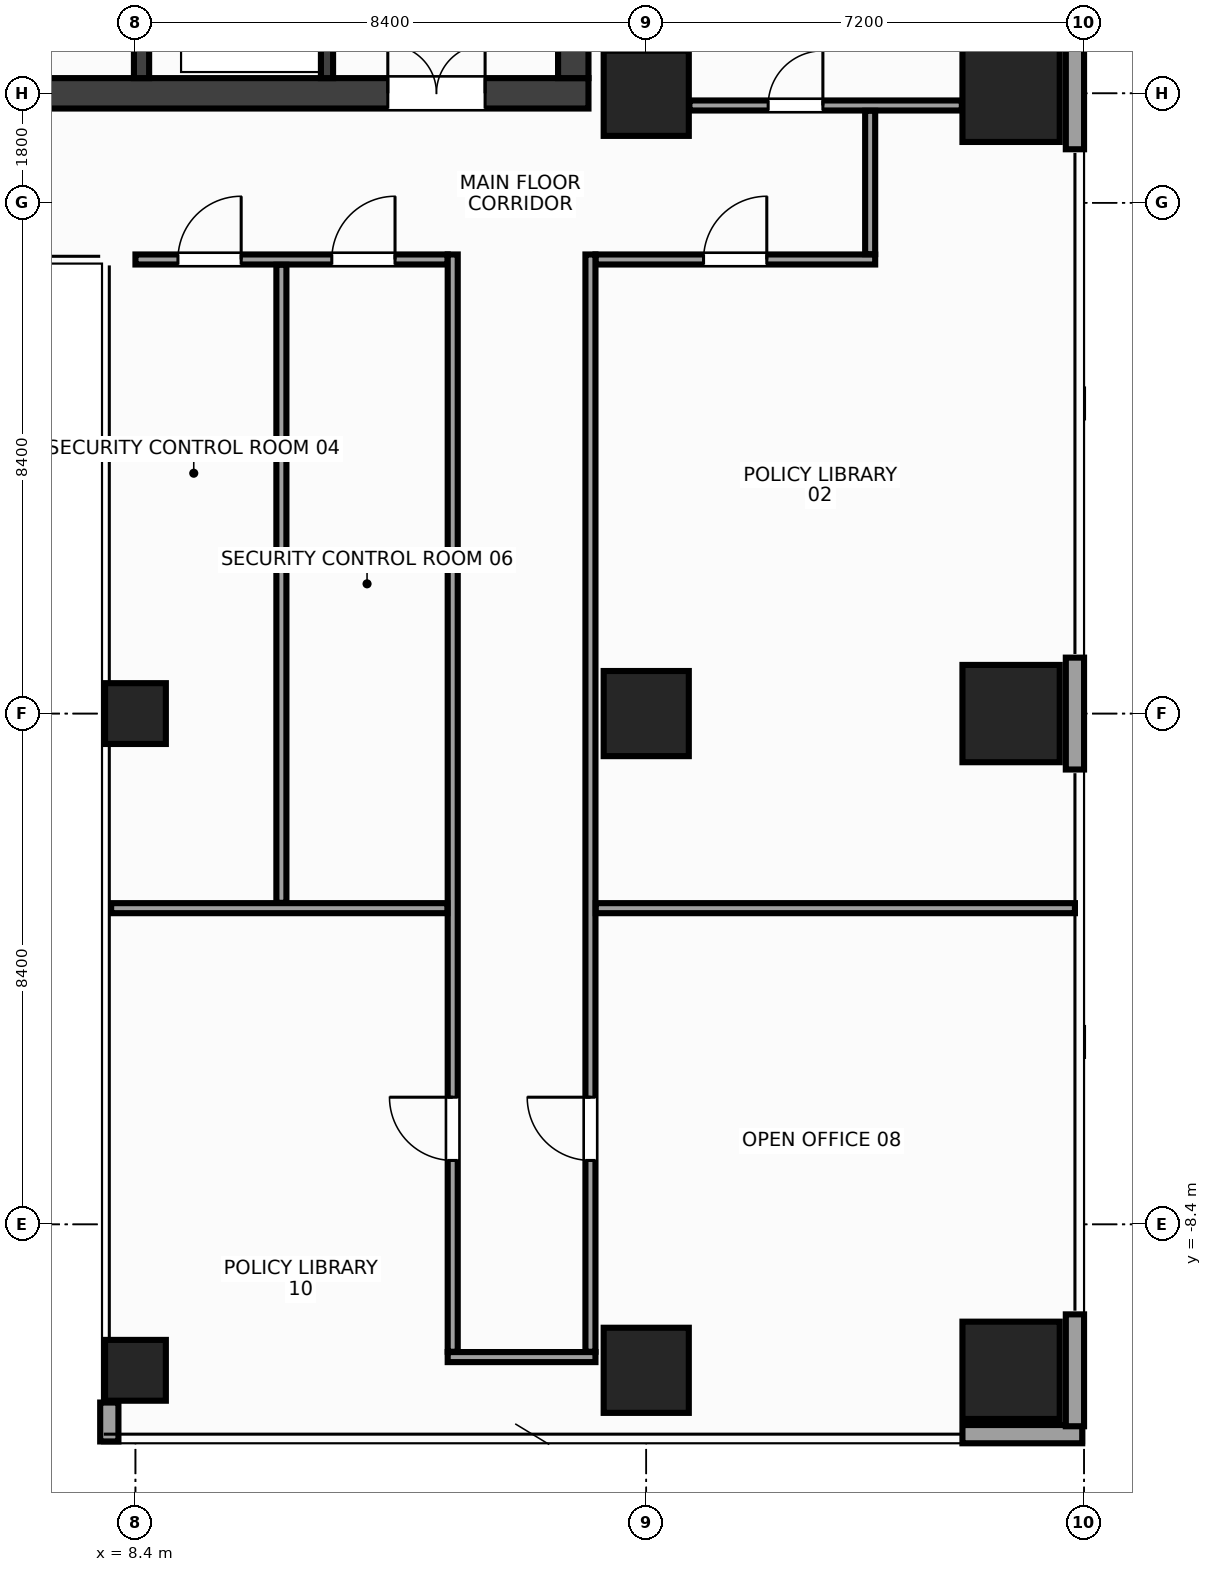
"""IFC4 building model, lengths in metres.
Left out: names, types, materials, properties, quantities, classifications, styles, units other than length and angle.
Written with IfcOpenShell. Run it as: python <this file> out.ifc"""

import sys

from ifc_helpers import new_model, si_unit, direction, frame, frame_2d, origin, origin_2d, place, context, subcontext, project, spatial, rectangle, hollow_rectangle, extrude, source, transform, mapped, element, fill, save


model = new_model("IFC4")
c1 = context("Model", 3, precision=1e-05, world=origin(), true_north=direction((0.0, 1.0)))
c2 = subcontext(c1, "Body", "Model", "MODEL_VIEW")
j1 = project(units=[si_unit("LENGTHUNIT", "METRE"), si_unit("PLANEANGLEUNIT", "RADIAN")], contexts=[c1])
p1 = place(None, origin())
s1 = spatial("IfcSite", under=j1, at=p1, CompositionType="ELEMENT")
p2 = place(p1, origin())
s2 = spatial("IfcBuilding", under=s1, at=p2, CompositionType="ELEMENT")
p3 = place(p2, frame((0.0, 0.0, 221.6)))
s3 = spatial("IfcBuildingStorey", under=s2, at=p3, CompositionType="ELEMENT", Elevation=221.6)
m1 = source(origin(), c2, "Body", "SweptSolid", [
    extrude(rectangle(XDim=31.7, YDim=0.5, at=frame_2d((15.85, 0.0))), origin(), (0.0, 0.0, 1.0), 3.6),
])
p4 = place(p3, frame((-15.85, 10.2, 0.0), z_axis=(0.0, 0.0, 1.0), x_axis=(1.0, 0.0, 0.0)))
e1 = element("IfcWall", 1, at=p4, inside=s3, PredefinedType="SHEAR", context=c2, shape_type="MappedRepresentation", body=[
    mapped(m1, transform((0.0, 0.0, 0.0), x_axis=(1.0, 0.0, 0.0), y_axis=(0.0, 1.0, 0.0), z_axis=(0.0, 0.0, 1.0), scale=1.0)),
])
p5 = place(p4, frame((1.7, 0.0, 0.0)))
e2 = element("IfcOpeningElement", 2, at=p5, cuts=e1, PredefinedType="OPENING", context=c2, shape_type="SweptSolid", body=[
    extrude(rectangle(XDim=1.6, YDim=2.15, at=frame_2d((0.8, 1.075))), frame((0.0, 0.262, 0.0), z_axis=(0.0, -1.0, 0.0), x_axis=(1.0, 0.0, 0.0)), (0.0, 0.0, 1.0), 0.524),
])
p6 = place(p4, frame((28.4, 0.0, 0.0)))
e3 = element("IfcOpeningElement", 3, at=p6, cuts=e1, PredefinedType="OPENING", context=c2, shape_type="SweptSolid", body=[
    extrude(rectangle(XDim=1.6, YDim=2.15, at=frame_2d((0.8, 1.075))), frame((0.0, 0.262, 0.0), z_axis=(0.0, -1.0, 0.0), x_axis=(1.0, 0.0, 0.0)), (0.0, 0.0, 1.0), 0.524),
])
p7 = place(p4, frame((15.1, 0.0, 0.0)))
e4 = element("IfcOpeningElement", 4, at=p7, cuts=e1, PredefinedType="OPENING", context=c2, shape_type="SweptSolid", body=[
    extrude(rectangle(XDim=1.5, YDim=2.2, at=frame_2d((0.75, 1.1))), frame((0.0, 0.262, 0.0), z_axis=(0.0, -1.0, 0.0), x_axis=(1.0, 0.0, 0.0)), (0.0, 0.0, 1.0), 0.524),
])
m2 = source(origin(), c2, "Body", "SweptSolid", [
    extrude(rectangle(XDim=13.1, YDim=0.5, at=frame_2d((6.55, 0.0))), origin(), (0.0, 0.0, 1.0), 3.6),
])
p8 = place(p3, frame((15.6, 10.45, 0.0), z_axis=(0.0, 0.0, 1.0), x_axis=(0.0, 1.0, 0.0)))
e5 = element("IfcWall", 5, at=p8, inside=s3, PredefinedType="SHEAR", context=c2, shape_type="MappedRepresentation", body=[
    mapped(m2, transform((0.0, 0.0, 0.0), x_axis=(1.0, 0.0, 0.0), y_axis=(0.0, 1.0, 0.0), z_axis=(0.0, 0.0, 1.0), scale=1.0)),
])
m3 = source(origin(), c2, "Body", "SweptSolid", [
    extrude(rectangle(XDim=13.1, YDim=0.25, at=frame_2d((6.55, 0.0))), origin(), (0.0, 0.0, 1.0), 3.6),
])
p9 = place(p3, frame((8.5, 10.45, 0.0), z_axis=(0.0, 0.0, 1.0), x_axis=(0.0, 1.0, 0.0)))
e6 = element("IfcWall", 6, at=p9, inside=s3, PredefinedType="SHEAR", context=c2, shape_type="MappedRepresentation", body=[
    mapped(m3, transform((0.0, 0.0, 0.0), x_axis=(1.0, 0.0, 0.0), y_axis=(0.0, 1.0, 0.0), z_axis=(0.0, 0.0, 1.0), scale=1.0)),
])
p10 = place(p9, frame((10.0, 0.0, 0.0)))
e7 = element("IfcOpeningElement", 7, at=p10, cuts=e6, PredefinedType="OPENING", context=c2, shape_type="SweptSolid", body=[
    extrude(rectangle(XDim=0.95, YDim=2.15, at=frame_2d((0.475, 1.075))), frame((0.0, 0.137, 0.0), z_axis=(0.0, -1.0, 0.0), x_axis=(1.0, 0.0, 0.0)), (0.0, 0.0, 1.0), 0.274),
])
m4 = source(origin(), c2, "Body", "SweptSolid", [
    extrude(rectangle(XDim=3.2, YDim=0.2, at=frame_2d((1.6, 0.0))), origin(), (0.0, 0.0, 1.0), 3.6),
])
p11 = place(p3, frame((11.55, 10.45, 0.0), z_axis=(0.0, 0.0, 1.0), x_axis=(0.0, 1.0, 0.0)))
e8 = element("IfcWall", 8, at=p11, inside=s3, PredefinedType="SHEAR", context=c2, shape_type="MappedRepresentation", body=[
    mapped(m4, transform((0.0, 0.0, 0.0), x_axis=(1.0, 0.0, 0.0), y_axis=(0.0, 1.0, 0.0), z_axis=(0.0, 0.0, 1.0), scale=1.0)),
])
p12 = place(p11, frame((0.9, 0.0, 0.0)))
e9 = element("IfcOpeningElement", 9, at=p12, cuts=e8, PredefinedType="OPENING", context=c2, shape_type="SweptSolid", body=[
    extrude(rectangle(XDim=1.1, YDim=2.15, at=frame_2d((0.55, 1.075))), frame((0.0, 0.112, 0.0), z_axis=(0.0, -1.0, 0.0), x_axis=(1.0, 0.0, 0.0)), (0.0, 0.0, 1.0), 0.224),
])
m5 = source(origin(), c2, "Body", "SweptSolid", [
    extrude(rectangle(XDim=1.4, YDim=1.4, at=origin_2d()), origin(), (0.0, 0.0, 1.0), 3.6),
])
for number, where, z_axis, x_axis in (
    (10, (16.8, -10.8, 0.0), (0.0, 0.0, 1.0), (1.0, 0.0, 0.0)),
    (11, (16.8, 0.0, 0.0), (0.0, 0.0, 1.0), (1.0, 0.0, 0.0)),
    (12, (16.8, 10.2, 0.0), (0.0, 0.0, 1.0), (1.0, 0.0, 0.0)),
):
    element("IfcColumn", number, at=place(p3, frame(where, z_axis=z_axis, x_axis=x_axis)), inside=s3, PredefinedType="COLUMN", context=c2, shape_type="MappedRepresentation", body=[
        mapped(m5, transform((0.0, 0.0, 0.0), x_axis=(1.0, 0.0, 0.0), y_axis=(0.0, 1.0, 0.0), z_axis=(0.0, 0.0, 1.0), scale=1.0)),
    ])
m6 = source(origin(), c2, "Body", "SweptSolid", [
    extrude(rectangle(XDim=1.6, YDim=1.6, at=origin_2d()), origin(), (0.0, 0.0, 1.0), 3.6),
])
for number, where, z_axis, x_axis in (
    (13, (22.8, -10.8, 0.0), (0.0, 0.0, 1.0), (1.0, 0.0, 0.0)),
    (14, (22.8, 0.0, 0.0), (0.0, 0.0, 1.0), (1.0, 0.0, 0.0)),
    (15, (22.8, 10.2, 0.0), (0.0, 0.0, 1.0), (1.0, 0.0, 0.0)),
):
    element("IfcColumn", number, at=place(p3, frame(where, z_axis=z_axis, x_axis=x_axis)), inside=s3, PredefinedType="COLUMN", context=c2, shape_type="MappedRepresentation", body=[
        mapped(m6, transform((0.0, 0.0, 0.0), x_axis=(1.0, 0.0, 0.0), y_axis=(0.0, 1.0, 0.0), z_axis=(0.0, 0.0, 1.0), scale=1.0)),
    ])
m7 = source(origin(), c2, "Body", "SweptSolid", [
    extrude(hollow_rectangle(XDim=1.0, YDim=1.0, WallThickness=0.045, at=origin_2d()), origin(), (0.0, 0.0, 1.0), 3.6),
])
for number, where, z_axis, x_axis in (
    (16, (8.4, 0.0, 0.0), (0.0, 0.0, 1.0), (1.0, 0.0, 0.0)),
    (17, (8.4, -10.8, 0.0), (0.0, 0.0, 1.0), (1.0, 0.0, 0.0)),
):
    element("IfcColumn", number, at=place(p3, frame(where, z_axis=z_axis, x_axis=x_axis)), inside=s3, PredefinedType="COLUMN", context=c2, shape_type="MappedRepresentation", body=[
        mapped(m7, transform((0.0, 0.0, 0.0), x_axis=(1.0, 0.0, 0.0), y_axis=(0.0, 1.0, 0.0), z_axis=(0.0, 0.0, 1.0), scale=1.0)),
    ])
m8 = source(origin(), c2, "Body", "SweptSolid", [
    extrude(rectangle(XDim=0.64, YDim=0.24, at=frame_2d((0.32, 0.0))), origin(), (0.0, 0.0, 1.0), 2.76),
])
p13 = place(p3, frame((7.97, -11.33, 0.0), z_axis=(0.0, 0.0, 1.0), x_axis=(0.0, -1.0, 0.0)))
e18 = element("IfcWall", 18, at=p13, inside=s3, PredefinedType="STANDARD", context=c2, shape_type="MappedRepresentation", body=[
    mapped(m8, transform((0.0, 0.0, 0.0), x_axis=(1.0, 0.0, 0.0), y_axis=(0.0, 1.0, 0.0), z_axis=(0.0, 0.0, 1.0), scale=1.0)),
])
m9 = source(origin(), c2, "Body", "SweptSolid", [
    extrude(rectangle(XDim=1.97, YDim=0.24, at=frame_2d((0.985, 0.0))), origin(), (0.0, 0.0, 1.0), 2.76),
])
p14 = place(p3, frame((22.0, -11.85, 0.0), z_axis=(0.0, 0.0, 1.0), x_axis=(1.0, 0.0, 0.0)))
e19 = element("IfcWall", 19, at=p14, inside=s3, PredefinedType="STANDARD", context=c2, shape_type="MappedRepresentation", body=[
    mapped(m9, transform((0.0, 0.0, 0.0), x_axis=(1.0, 0.0, 0.0), y_axis=(0.0, 1.0, 0.0), z_axis=(0.0, 0.0, 1.0), scale=1.0)),
])
m10 = source(origin(), c2, "Body", "SweptSolid", [
    extrude(rectangle(XDim=1.84, YDim=0.24, at=frame_2d((0.92, 0.0))), origin(), (0.0, 0.0, 1.0), 2.76),
])
p15 = place(p3, frame((23.85, -11.72, 0.0), z_axis=(0.0, 0.0, 1.0), x_axis=(0.0, 1.0, 0.0)))
e20 = element("IfcWall", 20, at=p15, inside=s3, PredefinedType="STANDARD", context=c2, shape_type="MappedRepresentation", body=[
    mapped(m10, transform((0.0, 0.0, 0.0), x_axis=(1.0, 0.0, 0.0), y_axis=(0.0, 1.0, 0.0), z_axis=(0.0, 0.0, 1.0), scale=1.0)),
])
m11 = source(origin(), c2, "Body", "SweptSolid", [
    extrude(rectangle(XDim=1.84, YDim=0.24, at=frame_2d((0.92, 0.0))), origin(), (0.0, 0.0, 1.0), 2.76),
])
p16 = place(p3, frame((23.85, -0.92, 0.0), z_axis=(0.0, 0.0, 1.0), x_axis=(0.0, 1.0, 0.0)))
e21 = element("IfcWall", 21, at=p16, inside=s3, PredefinedType="STANDARD", context=c2, shape_type="MappedRepresentation", body=[
    mapped(m11, transform((0.0, 0.0, 0.0), x_axis=(1.0, 0.0, 0.0), y_axis=(0.0, 1.0, 0.0), z_axis=(0.0, 0.0, 1.0), scale=1.0)),
])
p17 = place(p3, frame((23.85, 9.28, 0.0), z_axis=(0.0, 0.0, 1.0), x_axis=(0.0, 1.0, 0.0)))
e22 = element("IfcWall", 22, at=p17, inside=s3, PredefinedType="STANDARD", context=c2, shape_type="MappedRepresentation", body=[
    mapped(m10, transform((0.0, 0.0, 0.0), x_axis=(1.0, 0.0, 0.0), y_axis=(0.0, 1.0, 0.0), z_axis=(0.0, 0.0, 1.0), scale=1.0)),
])
m12 = source(origin(), c2, "Body", "SweptSolid", [
    extrude(rectangle(XDim=4.48, YDim=0.165, at=frame_2d((2.24, 0.0))), origin(), (0.0, 0.0, 1.0), 2.915),
])
p18 = place(p3, frame((17.51, 10.0, 0.0), z_axis=(0.0, 0.0, 1.0), x_axis=(1.0, 0.0, 0.0)))
e23 = element("IfcWall", 23, at=p18, inside=s3, PredefinedType="PARTITIONING", context=c2, shape_type="MappedRepresentation", body=[
    mapped(m12, transform((0.0, 0.0, 0.0), x_axis=(1.0, 0.0, 0.0), y_axis=(0.0, 1.0, 0.0), z_axis=(0.0, 0.0, 1.0), scale=1.0)),
])
p19 = place(p18, frame((1.295, 0.0, 0.0)))
e24 = element("IfcOpeningElement", 24, at=p19, cuts=e23, PredefinedType="OPENING", context=c2, shape_type="SweptSolid", body=[
    extrude(rectangle(XDim=0.9, YDim=2.15, at=frame_2d((0.45, 1.075))), frame((0.0, 0.094, 0.0), z_axis=(0.0, -1.0, 0.0), x_axis=(1.0, 0.0, 0.0)), (0.0, 0.0, 1.0), 0.189),
])
m13 = source(origin(), c2, "Body", "SweptSolid", [
    extrude(rectangle(XDim=5.135, YDim=0.165, at=frame_2d((2.567, 0.0))), origin(), (0.0, 0.0, 1.0), 3.38),
])
p20 = place(p3, frame((8.4, 7.468, 0.0), z_axis=(0.0, 0.0, 1.0), x_axis=(1.0, 0.0, 0.0)))
e25 = element("IfcWall", 25, at=p20, inside=s3, PredefinedType="PARTITIONING", context=c2, shape_type="MappedRepresentation", body=[
    mapped(m13, transform((0.0, 0.0, 0.0), x_axis=(1.0, 0.0, 0.0), y_axis=(0.0, 1.0, 0.0), z_axis=(0.0, 0.0, 1.0), scale=1.0)),
])
p21 = place(p20, frame((0.699, 0.0, 0.0)))
e26 = element("IfcOpeningElement", 26, at=p21, cuts=e25, PredefinedType="OPENING", context=c2, shape_type="SweptSolid", body=[
    extrude(rectangle(XDim=1.04, YDim=2.2, at=frame_2d((0.52, 1.1))), frame((0.0, 0.094, 0.0), z_axis=(0.0, -1.0, 0.0), x_axis=(1.0, 0.0, 0.0)), (0.0, 0.0, 1.0), 0.189),
])
p22 = place(p20, frame((3.229, 0.0, 0.0)))
e27 = element("IfcOpeningElement", 27, at=p22, cuts=e25, PredefinedType="OPENING", context=c2, shape_type="SweptSolid", body=[
    extrude(rectangle(XDim=1.04, YDim=2.2, at=frame_2d((0.52, 1.1))), frame((0.0, 0.094, 0.0), z_axis=(0.0, -1.0, 0.0), x_axis=(1.0, 0.0, 0.0)), (0.0, 0.0, 1.0), 0.189),
])
m14 = source(origin(), c2, "Body", "SweptSolid", [
    extrude(rectangle(XDim=4.6, YDim=0.165, at=frame_2d((2.3, 0.0))), origin(), (0.0, 0.0, 1.0), 2.765),
])
p23 = place(p3, frame((15.965, 7.468, 0.0), z_axis=(0.0, 0.0, 1.0), x_axis=(1.0, 0.0, 0.0)))
e28 = element("IfcWall", 28, at=p23, inside=s3, PredefinedType="PARTITIONING", context=c2, shape_type="MappedRepresentation", body=[
    mapped(m14, transform((0.0, 0.0, 0.0), x_axis=(1.0, 0.0, 0.0), y_axis=(0.0, 1.0, 0.0), z_axis=(0.0, 0.0, 1.0), scale=1.0)),
])
p24 = place(p23, frame((1.778, 0.0, 0.0)))
e29 = element("IfcOpeningElement", 29, at=p24, cuts=e28, PredefinedType="OPENING", context=c2, shape_type="SweptSolid", body=[
    extrude(rectangle(XDim=1.04, YDim=2.2, at=frame_2d((0.52, 1.1))), frame((0.0, 0.094, 0.0), z_axis=(0.0, -1.0, 0.0), x_axis=(1.0, 0.0, 0.0)), (0.0, 0.0, 1.0), 0.189),
])
m15 = source(origin(), c2, "Body", "SweptSolid", [
    extrude(rectangle(XDim=2.43, YDim=0.165, at=frame_2d((1.215, 0.0))), origin(), (0.0, 0.0, 1.0), 2.915),
])
p25 = place(p3, frame((13.535, -10.583, 0.0), z_axis=(0.0, 0.0, 1.0), x_axis=(1.0, 0.0, 0.0)))
e30 = element("IfcWall", 30, at=p25, inside=s3, PredefinedType="PARTITIONING", context=c2, shape_type="MappedRepresentation", body=[
    mapped(m15, transform((0.0, 0.0, 0.0), x_axis=(1.0, 0.0, 0.0), y_axis=(0.0, 1.0, 0.0), z_axis=(0.0, 0.0, 1.0), scale=1.0)),
])
m16 = source(origin(), c2, "Body", "SweptSolid", [
    extrude(rectangle(XDim=2.358, YDim=0.165, at=frame_2d((1.179, 0.0))), origin(), (0.0, 0.0, 1.0), 3.38),
])
p26 = place(p3, frame((20.482, 7.555, 0.0), z_axis=(0.0, 0.0, 1.0), x_axis=(0.0, 1.0, 0.0)))
e31 = element("IfcWall", 31, at=p26, inside=s3, PredefinedType="PARTITIONING", context=c2, shape_type="MappedRepresentation", body=[
    mapped(m16, transform((0.0, 0.0, 0.0), x_axis=(1.0, 0.0, 0.0), y_axis=(0.0, 1.0, 0.0), z_axis=(0.0, 0.0, 1.0), scale=1.0)),
])
m17 = source(origin(), c2, "Body", "SweptSolid", [
    extrude(rectangle(XDim=18.045, YDim=0.165, at=frame_2d((9.022, 0.0))), origin(), (0.0, 0.0, 1.0), 2.915),
])
p27 = place(p3, frame((13.617, -10.495, 0.0), z_axis=(0.0, 0.0, 1.0), x_axis=(0.0, 1.0, 0.0)))
e32 = element("IfcWall", 32, at=p27, inside=s3, PredefinedType="PARTITIONING", context=c2, shape_type="MappedRepresentation", body=[
    mapped(m17, transform((0.0, 0.0, 0.0), x_axis=(1.0, 0.0, 0.0), y_axis=(0.0, 1.0, 0.0), z_axis=(0.0, 0.0, 1.0), scale=1.0)),
])
p28 = place(p27, frame((3.146, 0.0, 0.0)))
e33 = element("IfcOpeningElement", 33, at=p28, cuts=e32, PredefinedType="OPENING", context=c2, shape_type="SweptSolid", body=[
    extrude(rectangle(XDim=1.04, YDim=2.2, at=frame_2d((0.52, 1.1))), frame((0.0, 0.094, 0.0), z_axis=(0.0, -1.0, 0.0), x_axis=(1.0, 0.0, 0.0)), (0.0, 0.0, 1.0), 0.189),
])
p29 = place(p3, frame((15.883, -10.495, 0.0), z_axis=(0.0, 0.0, 1.0), x_axis=(0.0, 1.0, 0.0)))
e34 = element("IfcWall", 34, at=p29, inside=s3, PredefinedType="PARTITIONING", context=c2, shape_type="MappedRepresentation", body=[
    mapped(m17, transform((0.0, 0.0, 0.0), x_axis=(1.0, 0.0, 0.0), y_axis=(0.0, 1.0, 0.0), z_axis=(0.0, 0.0, 1.0), scale=1.0)),
])
p30 = place(p29, frame((3.146, 0.0, 0.0)))
e35 = element("IfcOpeningElement", 35, at=p30, cuts=e34, PredefinedType="OPENING", context=c2, shape_type="SweptSolid", body=[
    extrude(rectangle(XDim=1.04, YDim=2.2, at=frame_2d((0.52, 1.1))), frame((0.0, 0.094, 0.0), z_axis=(0.0, -1.0, 0.0), x_axis=(1.0, 0.0, 0.0)), (0.0, 0.0, 1.0), 0.189),
])
m18 = source(origin(), c2, "Body", "SweptSolid", [
    extrude(rectangle(XDim=5.53, YDim=0.165, at=frame_2d((2.765, 0.0))), origin(), (0.0, 0.0, 1.0), 2.765),
])
p31 = place(p3, frame((8.0, -3.2, 0.0), z_axis=(0.0, 0.0, 1.0), x_axis=(1.0, 0.0, 0.0)))
e36 = element("IfcWall", 36, at=p31, inside=s3, PredefinedType="PARTITIONING", context=c2, shape_type="MappedRepresentation", body=[
    mapped(m18, transform((0.0, 0.0, 0.0), x_axis=(1.0, 0.0, 0.0), y_axis=(0.0, 1.0, 0.0), z_axis=(0.0, 0.0, 1.0), scale=1.0)),
])
m19 = source(origin(), c2, "Body", "SweptSolid", [
    extrude(rectangle(XDim=7.88, YDim=0.165, at=frame_2d((3.94, 0.0))), origin(), (0.0, 0.0, 1.0), 2.765),
])
p32 = place(p3, frame((15.97, -3.2, 0.0), z_axis=(0.0, 0.0, 1.0), x_axis=(1.0, 0.0, 0.0)))
e37 = element("IfcWall", 37, at=p32, inside=s3, PredefinedType="PARTITIONING", context=c2, shape_type="MappedRepresentation", body=[
    mapped(m19, transform((0.0, 0.0, 0.0), x_axis=(1.0, 0.0, 0.0), y_axis=(0.0, 1.0, 0.0), z_axis=(0.0, 0.0, 1.0), scale=1.0)),
])
m20 = source(origin(), c2, "Body", "SweptSolid", [
    extrude(rectangle(XDim=10.492, YDim=0.165, at=frame_2d((5.246, 0.0))), origin(), (0.0, 0.0, 1.0), 2.915),
])
p33 = place(p3, frame((10.8, -3.113, 0.0), z_axis=(0.0, 0.0, 1.0), x_axis=(0.0, 1.0, 0.0)))
e38 = element("IfcWall", 38, at=p33, inside=s3, PredefinedType="PARTITIONING", context=c2, shape_type="MappedRepresentation", body=[
    mapped(m20, transform((0.0, 0.0, 0.0), x_axis=(1.0, 0.0, 0.0), y_axis=(0.0, 1.0, 0.0), z_axis=(0.0, 0.0, 1.0), scale=1.0)),
])
m21 = source(origin(), c2, "Body", "SweptSolid", [
    extrude(rectangle(XDim=1.6, YDim=2.15, at=frame_2d((0.8, 1.075))), frame((0.0, 0.025, 0.0), z_axis=(0.0, -1.0, 0.0), x_axis=(1.0, 0.0, 0.0)), (0.0, 0.0, 1.0), 0.05),
])
p34 = place(p6, origin())
e39 = element("IfcDoor", 39, at=p34, inside=s3, OperationType="DOUBLE_DOOR_SINGLE_SWING", PredefinedType="DOOR", context=c2, shape_type="MappedRepresentation", body=[
    mapped(m21, transform((0.0, 0.0, 0.0), x_axis=(1.0, 0.0, 0.0), y_axis=(0.0, 1.0, 0.0), z_axis=(0.0, 0.0, 1.0), scale=1.0)),
])
fill(e3, e39)
m22 = source(origin(), c2, "Body", "SweptSolid", [
    extrude(rectangle(XDim=0.9, YDim=2.15, at=frame_2d((0.45, 1.075))), frame((0.0, 0.025, 0.0), z_axis=(0.0, -1.0, 0.0), x_axis=(1.0, 0.0, 0.0)), (0.0, 0.0, 1.0), 0.05),
])
p35 = place(p19, origin())
e40 = element("IfcDoor", 40, at=p35, inside=s3, OperationType="SINGLE_SWING_RIGHT", PredefinedType="DOOR", context=c2, shape_type="MappedRepresentation", body=[
    mapped(m22, transform((0.0, 0.0, 0.0), x_axis=(1.0, 0.0, 0.0), y_axis=(0.0, 1.0, 0.0), z_axis=(0.0, 0.0, 1.0), scale=1.0)),
])
fill(e24, e40)
m23 = source(origin(), c2, "Body", "SweptSolid", [
    extrude(rectangle(XDim=1.04, YDim=2.2, at=frame_2d((0.52, 1.1))), frame((0.0, 0.025, 0.0), z_axis=(0.0, -1.0, 0.0), x_axis=(1.0, 0.0, 0.0)), (0.0, 0.0, 1.0), 0.05),
])
p36 = place(p24, origin())
e41 = element("IfcDoor", 41, at=p36, inside=s3, OperationType="SINGLE_SWING_RIGHT", PredefinedType="DOOR", context=c2, shape_type="MappedRepresentation", body=[
    mapped(m23, transform((0.0, 0.0, 0.0), x_axis=(1.0, 0.0, 0.0), y_axis=(0.0, 1.0, 0.0), z_axis=(0.0, 0.0, 1.0), scale=1.0)),
])
fill(e29, e41)
p37 = place(p21, origin())
e42 = element("IfcDoor", 42, at=p37, inside=s3, OperationType="SINGLE_SWING_RIGHT", PredefinedType="DOOR", context=c2, shape_type="MappedRepresentation", body=[
    mapped(m23, transform((0.0, 0.0, 0.0), x_axis=(1.0, 0.0, 0.0), y_axis=(0.0, 1.0, 0.0), z_axis=(0.0, 0.0, 1.0), scale=1.0)),
])
fill(e26, e42)
p38 = place(p22, origin())
e43 = element("IfcDoor", 43, at=p38, inside=s3, OperationType="SINGLE_SWING_RIGHT", PredefinedType="DOOR", context=c2, shape_type="MappedRepresentation", body=[
    mapped(m23, transform((0.0, 0.0, 0.0), x_axis=(1.0, 0.0, 0.0), y_axis=(0.0, 1.0, 0.0), z_axis=(0.0, 0.0, 1.0), scale=1.0)),
])
fill(e27, e43)
p39 = place(p30, origin())
e44 = element("IfcDoor", 44, at=p39, inside=s3, OperationType="SINGLE_SWING_RIGHT", PredefinedType="DOOR", context=c2, shape_type="MappedRepresentation", body=[
    mapped(m23, transform((0.0, 0.0, 0.0), x_axis=(1.0, 0.0, 0.0), y_axis=(0.0, 1.0, 0.0), z_axis=(0.0, 0.0, 1.0), scale=1.0)),
])
fill(e35, e44)
p40 = place(p28, origin())
e45 = element("IfcDoor", 45, at=p40, inside=s3, OperationType="SINGLE_SWING_RIGHT", PredefinedType="DOOR", context=c2, shape_type="MappedRepresentation", body=[
    mapped(m23, transform((0.0, 0.0, 0.0), x_axis=(1.0, 0.0, 0.0), y_axis=(0.0, 1.0, 0.0), z_axis=(0.0, 0.0, 1.0), scale=1.0)),
])
fill(e33, e45)
save(model, sys.argv[1])
